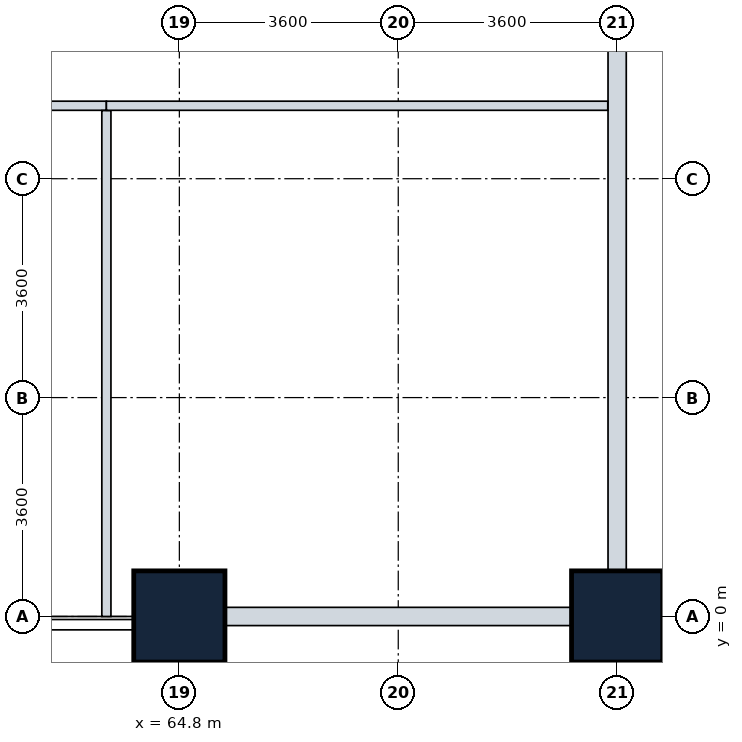
"""IFC4 building model, lengths in metres.
Left out: names, types, materials, properties, quantities, classifications, styles, units other than length and angle.
Written with IfcOpenShell. Run it as: python <this file> out.ifc"""

import sys

from ifc_helpers import new_model, si_unit, direction, frame, frame_2d, origin, origin_2d, place, context, subcontext, project, spatial, rectangle, extrude, element, fill, save


model = new_model("IFC4")
c1 = context("Model", 3, precision=1e-05, world=origin(), true_north=direction((0.0, 1.0)))
c2 = subcontext(c1, "Body", "Model", "MODEL_VIEW")
j1 = project(units=[si_unit("LENGTHUNIT", "METRE"), si_unit("PLANEANGLEUNIT", "RADIAN")], contexts=[c1])
p1 = place(None, origin())
s1 = spatial("IfcSite", under=j1, at=p1, CompositionType="ELEMENT")
p2 = place(p1, origin())
s2 = spatial("IfcBuilding", under=s1, at=p2, CompositionType="ELEMENT")
p3 = place(p2, origin())
s3 = spatial("IfcBuildingStorey", under=s2, at=p3, CompositionType="ELEMENT", Elevation=0.0)
for number, where, z_axis, x_axis in (
    (1, (64.8, 0.0, 0.0), (0.0, 0.0, 1.0), (1.0, 0.0, 0.0)),
    (2, (72.0, 0.0, 0.0), (0.0, 0.0, 1.0), (1.0, 0.0, 0.0)),
):
    element("IfcColumn", number, at=place(p3, frame(where, z_axis=z_axis, x_axis=x_axis)), inside=s3, PredefinedType="COLUMN", context=c2, shape_type="SweptSolid", body=[
        extrude(rectangle(XDim=1.5, YDim=1.5, at=origin_2d()), origin(), (0.0, 0.0, 1.0), 5.4),
    ])
p4 = place(p3, frame((72.0, 0.0, 0.0), z_axis=(0.0, 0.0, 1.0), x_axis=(-1.0, 0.0, 0.0)))
e3 = element("IfcWall", 3, at=p4, inside=s3, PredefinedType="STANDARD", context=c2, shape_type="SweptSolid", body=[
    extrude(rectangle(XDim=7.2, YDim=0.3, at=frame_2d((3.6, 0.0))), origin(), (0.0, 0.0, 1.0), 4.43),
])
p5 = place(p4, frame((2.6, 0.0, 0.0)))
e4 = element("IfcOpeningElement", 4, at=p5, cuts=e3, PredefinedType="OPENING", context=c2, shape_type="SweptSolid", body=[
    extrude(rectangle(XDim=2.0, YDim=2.4, at=frame_2d((1.0, 1.2))), frame((0.0, 0.16, 0.0), z_axis=(0.0, -1.0, 0.0), x_axis=(1.0, 0.0, 0.0)), (0.0, 0.0, 1.0), 0.32),
])
p6 = place(p3, frame((72.0, 50.4, 0.0), z_axis=(0.0, 0.0, 1.0), x_axis=(0.0, -1.0, 0.0)))
e5 = element("IfcWall", 5, at=p6, inside=s3, PredefinedType="STANDARD", context=c2, shape_type="SweptSolid", body=[
    extrude(rectangle(XDim=50.4, YDim=0.3, at=frame_2d((25.2, 0.0))), origin(), (0.0, 0.0, 1.0), 4.43),
])
p7 = place(p6, frame((43.8, 0.0, 0.9)))
e6 = element("IfcOpeningElement", 6, at=p7, cuts=e5, PredefinedType="OPENING", context=c2, shape_type="SweptSolid", body=[
    extrude(rectangle(XDim=2.4, YDim=1.6, at=frame_2d((1.2, 0.8))), frame((0.0, 0.16, 0.0), z_axis=(0.0, -1.0, 0.0), x_axis=(1.0, 0.0, 0.0)), (0.0, 0.0, 1.0), 0.32),
])
p8 = place(p6, frame((33.0, 0.0, 0.9)))
e7 = element("IfcOpeningElement", 7, at=p8, cuts=e5, PredefinedType="OPENING", context=c2, shape_type="SweptSolid", body=[
    extrude(rectangle(XDim=2.4, YDim=1.6, at=frame_2d((1.2, 0.8))), frame((0.0, 0.16, 0.0), z_axis=(0.0, -1.0, 0.0), x_axis=(1.0, 0.0, 0.0)), (0.0, 0.0, 1.0), 0.32),
])
p9 = place(p6, frame((22.2, 0.0, 0.9)))
e8 = element("IfcOpeningElement", 8, at=p9, cuts=e5, PredefinedType="OPENING", context=c2, shape_type="SweptSolid", body=[
    extrude(rectangle(XDim=2.4, YDim=1.6, at=frame_2d((1.2, 0.8))), frame((0.0, 0.16, 0.0), z_axis=(0.0, -1.0, 0.0), x_axis=(1.0, 0.0, 0.0)), (0.0, 0.0, 1.0), 0.32),
])
p10 = place(p6, frame((2.4, 0.0, 0.9)))
e9 = element("IfcOpeningElement", 9, at=p10, cuts=e5, PredefinedType="OPENING", context=c2, shape_type="SweptSolid", body=[
    extrude(rectangle(XDim=2.4, YDim=1.6, at=frame_2d((1.2, 0.8))), frame((0.0, 0.16, 0.0), z_axis=(0.0, -1.0, 0.0), x_axis=(1.0, 0.0, 0.0)), (0.0, 0.0, 1.0), 0.32),
])
p11 = place(p3, frame((51.6, 8.4, 0.0), z_axis=(0.0, 0.0, 1.0), x_axis=(1.0, 0.0, 0.0)))
e10 = element("IfcWall", 10, at=p11, inside=s3, PredefinedType="PARTITIONING", context=c2, shape_type="SweptSolid", body=[
    extrude(rectangle(XDim=12.0, YDim=0.15, at=frame_2d((6.0, 0.0))), origin(), (0.0, 0.0, 1.0), 4.43),
])
p12 = place(p11, frame((5.16, 0.0, 0.0)))
e11 = element("IfcOpeningElement", 11, at=p12, cuts=e10, PredefinedType="OPENING", context=c2, shape_type="SweptSolid", body=[
    extrude(rectangle(XDim=1.6, YDim=2.2, at=frame_2d((0.8, 1.1))), frame((0.0, 0.085, 0.0), z_axis=(0.0, -1.0, 0.0), x_axis=(1.0, 0.0, 0.0)), (0.0, 0.0, 1.0), 0.17),
])
p13 = place(p3, frame((63.6, 0.0, 0.0), z_axis=(0.0, 0.0, 1.0), x_axis=(0.0, 1.0, 0.0)))
e12 = element("IfcWall", 12, at=p13, inside=s3, PredefinedType="PARTITIONING", context=c2, shape_type="SweptSolid", body=[
    extrude(rectangle(XDim=8.321, YDim=0.15, at=frame_2d((4.161, 0.0))), origin(), (0.0, 0.0, 1.0), 4.43),
])
p14 = place(p3, frame((63.6, 8.4, 0.0), z_axis=(0.0, 0.0, 1.0), x_axis=(1.0, 0.0, 0.0)))
e13 = element("IfcWall", 13, at=p14, inside=s3, PredefinedType="PARTITIONING", context=c2, shape_type="SweptSolid", body=[
    extrude(rectangle(XDim=8.246, YDim=0.15, at=frame_2d((4.123, 0.0))), origin(), (0.0, 0.0, 1.0), 4.43),
])
p15 = place(p14, frame((3.4, 0.0, 0.0)))
e14 = element("IfcOpeningElement", 14, at=p15, cuts=e13, PredefinedType="OPENING", context=c2, shape_type="SweptSolid", body=[
    extrude(rectangle(XDim=1.6, YDim=2.2, at=frame_2d((0.8, 1.1))), frame((0.0, 0.085, 0.0), z_axis=(0.0, -1.0, 0.0), x_axis=(1.0, 0.0, 0.0)), (0.0, 0.0, 1.0), 0.17),
])
p16 = place(p5, origin())
e15 = element("IfcDoor", 15, at=p16, inside=s3, OperationType="SINGLE_SWING_LEFT", PredefinedType="DOOR", context=c2, shape_type="SweptSolid", body=[
    extrude(rectangle(XDim=2.0, YDim=2.4, at=frame_2d((1.0, 1.2))), frame((0.0, 0.025, 0.0), z_axis=(0.0, -1.0, 0.0), x_axis=(1.0, 0.0, 0.0)), (0.0, 0.0, 1.0), 0.05),
])
fill(e4, e15)
p17 = place(p7, origin())
e16 = element("IfcWindow", 16, at=p17, inside=s3, PartitioningType="SINGLE_PANEL", PredefinedType="WINDOW", context=c2, shape_type="SweptSolid", body=[
    extrude(rectangle(XDim=2.4, YDim=1.6, at=frame_2d((1.2, 0.8))), frame((0.0, 0.03, 0.0), z_axis=(0.0, -1.0, 0.0), x_axis=(1.0, 0.0, 0.0)), (0.0, 0.0, 1.0), 0.06),
])
fill(e6, e16)
p18 = place(p15, origin())
e17 = element("IfcDoor", 17, at=p18, inside=s3, OperationType="DOUBLE_DOOR_SINGLE_SWING", PredefinedType="DOOR", context=c2, shape_type="SweptSolid", body=[
    extrude(rectangle(XDim=1.6, YDim=2.2, at=frame_2d((0.8, 1.1))), frame((0.0, 0.025, 0.0), z_axis=(0.0, -1.0, 0.0), x_axis=(1.0, 0.0, 0.0)), (0.0, 0.0, 1.0), 0.05),
])
fill(e14, e17)
save(model, sys.argv[1])
